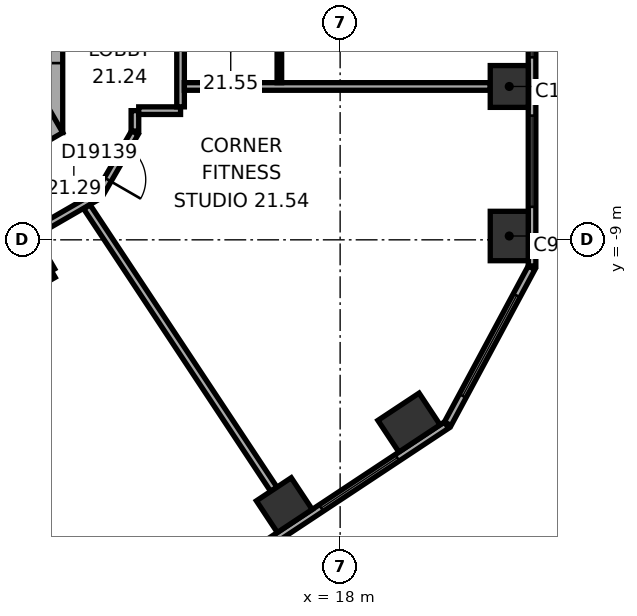
"""IFC4 building model, lengths in metres.
Left out: names, types, materials, properties, quantities, classifications, styles, units other than length and angle.
Written with IfcOpenShell. Run it as: python <this file> out.ifc"""

import sys

from ifc_helpers import new_model, si_unit, direction, frame, frame_2d, origin, origin_2d, place, context, subcontext, project, spatial, rectangle, extrude, element, fill, save


model = new_model("IFC4")
c1 = context("Model", 3, precision=1e-05, world=origin(), true_north=direction((0.0, 1.0)))
c2 = subcontext(c1, "Body", "Model", "MODEL_VIEW")
j1 = project(units=[si_unit("LENGTHUNIT", "METRE"), si_unit("PLANEANGLEUNIT", "RADIAN")], contexts=[c1])
p1 = place(None, origin())
s1 = spatial("IfcSite", under=j1, at=p1, CompositionType="ELEMENT")
p2 = place(p1, origin())
s2 = spatial("IfcBuilding", under=s1, at=p2, CompositionType="ELEMENT")
p3 = place(p2, frame((0.0, 0.0, 93.5)))
s3 = spatial("IfcBuildingStorey", under=s2, at=p3, CompositionType="ELEMENT", Elevation=93.5)
p4 = place(p3, frame((22.45, -8.899, 0.0), z_axis=(0.0, 0.0, 1.0), x_axis=(0.0, 1.0, 0.0)))
e1 = element("IfcColumn", 1, at=p4, inside=s3, PredefinedType="COLUMN", context=c2, shape_type="SweptSolid", body=[
    extrude(rectangle(XDim=1.3, YDim=1.0, at=origin_2d()), origin(), (0.0, 0.0, 1.0), 3.3),
])
for number, where, z_axis, x_axis in (
    (2, (22.45, -4.965, 0.0), (0.0, 0.0, 1.0), (0.0, 1.0, 0.0)),
    (3, (16.531, -15.981, 0.0), (0.0, 0.0, 1.0), (0.834, 0.552, 0.0)),
):
    element("IfcColumn", number, at=place(p3, frame(where, z_axis=z_axis, x_axis=x_axis)), inside=s3, PredefinedType="COLUMN", context=c2, shape_type="SweptSolid", body=[
        extrude(rectangle(XDim=1.1, YDim=1.0, at=origin_2d()), origin(), (0.0, 0.0, 1.0), 3.3),
    ])
p5 = place(p3, frame((19.812, -13.809, 0.0), z_axis=(0.0, 0.0, 1.0), x_axis=(0.833885822067, 0.551936985312, 0.0)))
e4 = element("IfcColumn", 4, at=p5, inside=s3, PredefinedType="COLUMN", context=c2, shape_type="SweptSolid", body=[
    extrude(rectangle(XDim=1.3, YDim=1.0, at=origin_2d()), origin(), (0.0, 0.0, 1.0), 3.3),
])
p6 = place(p3, frame((10.1, -6.177, 0.0), z_axis=(0.0, 0.0, 1.0), x_axis=(0.0, 1.0, 0.0)))
e5 = element("IfcWall", 5, at=p6, inside=s3, PredefinedType="SHEAR", context=c2, shape_type="SweptSolid", body=[
    extrude(rectangle(XDim=12.355, YDim=1.2, at=frame_2d((6.177, 0.0))), origin(), (0.0, 0.0, 1.0), 3.3),
])
p7 = place(p6, frame((6.378, 0.0, 0.0)))
e6 = element("IfcOpeningElement", 6, at=p7, cuts=e5, PredefinedType="OPENING", context=c2, shape_type="SweptSolid", body=[
    extrude(rectangle(XDim=1.5, YDim=2.1, at=frame_2d((0.75, 1.05))), frame((0.0, 0.61, 0.0), z_axis=(0.0, -1.0, 0.0), x_axis=(1.0, 0.0, 0.0)), (0.0, 0.0, 1.0), 1.22),
])
p8 = place(p6, frame((1.828, 0.0, 0.0)))
e7 = element("IfcOpeningElement", 7, at=p8, cuts=e5, PredefinedType="OPENING", context=c2, shape_type="SweptSolid", body=[
    extrude(rectangle(XDim=1.1, YDim=2.1, at=frame_2d((0.55, 1.05))), frame((0.0, 0.61, 0.0), z_axis=(0.0, -1.0, 0.0), x_axis=(1.0, 0.0, 0.0)), (0.0, 0.0, 1.0), 1.22),
])
p9 = place(p6, frame((4.427, 0.0, 0.0)))
e8 = element("IfcOpeningElement", 8, at=p9, cuts=e5, PredefinedType="OPENING", context=c2, shape_type="SweptSolid", body=[
    extrude(rectangle(XDim=1.1, YDim=2.1, at=frame_2d((0.55, 1.05))), frame((0.0, 0.61, 0.0), z_axis=(0.0, -1.0, 0.0), x_axis=(1.0, 0.0, 0.0)), (0.0, 0.0, 1.0), 1.22),
])
p10 = place(p3, frame((-0.3, -11.836, 0.0), z_axis=(0.0, 0.0, 1.0), x_axis=(0.866021384402, 0.500006961711, 0.0)))
e9 = element("IfcWall", 9, at=p10, inside=s3, PredefinedType="SHEAR", context=c2, shape_type="SweptSolid", body=[
    extrude(rectangle(XDim=12.355, YDim=1.2, at=frame_2d((6.178, 0.0))), origin(), (0.0, 0.0, 1.0), 3.3),
])
p11 = place(p10, frame((2.828, 0.0, 0.0)))
e10 = element("IfcOpeningElement", 10, at=p11, cuts=e9, PredefinedType="OPENING", context=c2, shape_type="SweptSolid", body=[
    extrude(rectangle(XDim=0.9, YDim=2.1, at=frame_2d((0.45, 1.05))), frame((0.0, 0.61, 0.0), z_axis=(0.0, -1.0, 0.0), x_axis=(1.0, 0.0, 0.0)), (0.0, 0.0, 1.0), 1.22),
])
p12 = place(p10, frame((5.428, 0.0, 0.0)))
e11 = element("IfcOpeningElement", 11, at=p12, cuts=e9, PredefinedType="OPENING", context=c2, shape_type="SweptSolid", body=[
    extrude(rectangle(XDim=0.9, YDim=2.1, at=frame_2d((0.45, 1.05))), frame((0.0, 0.61, 0.0), z_axis=(0.0, -1.0, 0.0), x_axis=(1.0, 0.0, 0.0)), (0.0, 0.0, 1.0), 1.22),
])
p13 = place(p10, frame((7.928, 0.0, 0.0)))
e12 = element("IfcOpeningElement", 12, at=p13, cuts=e9, PredefinedType="OPENING", context=c2, shape_type="SweptSolid", body=[
    extrude(rectangle(XDim=1.1, YDim=2.1, at=frame_2d((0.55, 1.05))), frame((0.0, 0.61, 0.0), z_axis=(0.0, -1.0, 0.0), x_axis=(1.0, 0.0, 0.0)), (0.0, 0.0, 1.0), 1.22),
])
p14 = place(p3, frame((23.05, -9.687, 0.0), z_axis=(0.0, 0.0, 1.0), x_axis=(0.0, 1.0, 0.0)))
e13 = element("IfcWall", 13, at=p14, inside=s3, PredefinedType="STANDARD", context=c2, shape_type="SweptSolid", body=[
    extrude(rectangle(XDim=21.246, YDim=0.2, at=frame_2d((10.623, 0.0))), origin(), (0.0, 0.0, 1.0), 3.3),
])
p15 = place(p14, frame((1.555, 0.0, 0.8)))
e14 = element("IfcOpeningElement", 14, at=p15, cuts=e13, PredefinedType="OPENING", context=c2, shape_type="SweptSolid", body=[
    extrude(rectangle(XDim=2.4, YDim=1.7, at=frame_2d((1.2, 0.85))), frame((0.0, 0.11, 0.0), z_axis=(0.0, -1.0, 0.0), x_axis=(1.0, 0.0, 0.0)), (0.0, 0.0, 1.0), 0.22),
])
p16 = place(p14, frame((5.489, 0.0, 0.8)))
e15 = element("IfcOpeningElement", 15, at=p16, cuts=e13, PredefinedType="OPENING", context=c2, shape_type="SweptSolid", body=[
    extrude(rectangle(XDim=2.4, YDim=1.7, at=frame_2d((1.2, 0.85))), frame((0.0, 0.11, 0.0), z_axis=(0.0, -1.0, 0.0), x_axis=(1.0, 0.0, 0.0)), (0.0, 0.0, 1.0), 0.22),
])
p17 = place(p14, frame((9.424, 0.0, 0.8)))
e16 = element("IfcOpeningElement", 16, at=p17, cuts=e13, PredefinedType="OPENING", context=c2, shape_type="SweptSolid", body=[
    extrude(rectangle(XDim=2.4, YDim=1.7, at=frame_2d((1.2, 0.85))), frame((0.0, 0.11, 0.0), z_axis=(0.0, -1.0, 0.0), x_axis=(1.0, 0.0, 0.0)), (0.0, 0.0, 1.0), 0.22),
])
p18 = place(p14, frame((13.358, 0.0, 0.8)))
e17 = element("IfcOpeningElement", 17, at=p18, cuts=e13, PredefinedType="OPENING", context=c2, shape_type="SweptSolid", body=[
    extrude(rectangle(XDim=2.4, YDim=1.7, at=frame_2d((1.2, 0.85))), frame((0.0, 0.11, 0.0), z_axis=(0.0, -1.0, 0.0), x_axis=(1.0, 0.0, 0.0)), (0.0, 0.0, 1.0), 0.22),
])
p19 = place(p14, frame((17.293, 0.0, 0.8)))
e18 = element("IfcOpeningElement", 18, at=p19, cuts=e13, PredefinedType="OPENING", context=c2, shape_type="SweptSolid", body=[
    extrude(rectangle(XDim=2.4, YDim=1.7, at=frame_2d((1.2, 0.85))), frame((0.0, 0.11, 0.0), z_axis=(0.0, -1.0, 0.0), x_axis=(1.0, 0.0, 0.0)), (0.0, 0.0, 1.0), 0.22),
])
p20 = place(p3, frame((3.083, -25.601, 0.0), z_axis=(0.0, 0.0, 1.0), x_axis=(0.833884295743, 0.551939291329, 0.0)))
e19 = element("IfcWall", 19, at=p20, inside=s3, PredefinedType="STANDARD", context=c2, shape_type="SweptSolid", body=[
    extrude(rectangle(XDim=21.246, YDim=0.2, at=frame_2d((10.623, 0.0))), origin(), (0.0, 0.0, 1.0), 3.3),
])
p21 = place(p20, frame((1.553, 0.0, 0.8)))
e20 = element("IfcOpeningElement", 20, at=p21, cuts=e19, PredefinedType="OPENING", context=c2, shape_type="SweptSolid", body=[
    extrude(rectangle(XDim=2.4, YDim=1.7, at=frame_2d((1.2, 0.85))), frame((0.0, 0.11, 0.0), z_axis=(0.0, -1.0, 0.0), x_axis=(1.0, 0.0, 0.0)), (0.0, 0.0, 1.0), 0.22),
])
p22 = place(p20, frame((5.488, 0.0, 0.8)))
e21 = element("IfcOpeningElement", 21, at=p22, cuts=e19, PredefinedType="OPENING", context=c2, shape_type="SweptSolid", body=[
    extrude(rectangle(XDim=2.4, YDim=1.7, at=frame_2d((1.2, 0.85))), frame((0.0, 0.11, 0.0), z_axis=(0.0, -1.0, 0.0), x_axis=(1.0, 0.0, 0.0)), (0.0, 0.0, 1.0), 0.22),
])
p23 = place(p20, frame((9.422, 0.0, 0.8)))
e22 = element("IfcOpeningElement", 22, at=p23, cuts=e19, PredefinedType="OPENING", context=c2, shape_type="SweptSolid", body=[
    extrude(rectangle(XDim=2.4, YDim=1.7, at=frame_2d((1.2, 0.85))), frame((0.0, 0.11, 0.0), z_axis=(0.0, -1.0, 0.0), x_axis=(1.0, 0.0, 0.0)), (0.0, 0.0, 1.0), 0.22),
])
p24 = place(p20, frame((13.357, 0.0, 0.8)))
e23 = element("IfcOpeningElement", 23, at=p24, cuts=e19, PredefinedType="OPENING", context=c2, shape_type="SweptSolid", body=[
    extrude(rectangle(XDim=2.4, YDim=1.7, at=frame_2d((1.2, 0.85))), frame((0.0, 0.11, 0.0), z_axis=(0.0, -1.0, 0.0), x_axis=(1.0, 0.0, 0.0)), (0.0, 0.0, 1.0), 0.22),
])
p25 = place(p20, frame((17.291, 0.0, 0.8)))
e24 = element("IfcOpeningElement", 24, at=p25, cuts=e19, PredefinedType="OPENING", context=c2, shape_type="SweptSolid", body=[
    extrude(rectangle(XDim=2.4, YDim=1.7, at=frame_2d((1.2, 0.85))), frame((0.0, 0.11, 0.0), z_axis=(0.0, -1.0, 0.0), x_axis=(1.0, 0.0, 0.0)), (0.0, 0.0, 1.0), 0.22),
])
p26 = place(p3, frame((20.833, -13.839, 0.0), z_axis=(0.0, 0.0, 1.0), x_axis=(0.473321668581, 0.880889662813, 0.0)))
e25 = element("IfcWall", 25, at=p26, inside=s3, PredefinedType="STANDARD", context=c2, shape_type="SweptSolid", body=[
    extrude(rectangle(XDim=4.66, YDim=0.2, at=frame_2d((2.33, 0.0))), origin(), (0.0, 0.0, 1.0), 3.3),
])
p27 = place(p26, frame((0.83, 0.0, 0.8)))
e26 = element("IfcOpeningElement", 26, at=p27, cuts=e25, PredefinedType="OPENING", context=c2, shape_type="SweptSolid", body=[
    extrude(rectangle(XDim=3.0, YDim=1.7, at=frame_2d((1.5, 0.85))), frame((0.0, 0.11, 0.0), z_axis=(0.0, -1.0, 0.0), x_axis=(1.0, 0.0, 0.0)), (0.0, 0.0, 1.0), 0.22),
])
p28 = place(p3, frame((7.419, -11.653, 0.0), z_axis=(0.0, 0.0, 1.0), x_axis=(0.866038154057, 0.49997791523, 0.0)))
e27 = element("IfcWall", 27, at=p28, inside=s3, PredefinedType="PARTITIONING", context=c2, shape_type="SweptSolid", body=[
    extrude(rectangle(XDim=3.502, YDim=0.2, at=frame_2d((1.751, 0.0))), origin(), (0.0, 0.0, 1.0), 3.05),
])
p29 = place(p3, frame((9.852, -8.861, 0.0), z_axis=(0.0, 0.0, 1.0), x_axis=(0.866013291437, 0.500020978615, 0.0)))
e28 = element("IfcWall", 28, at=p29, inside=s3, PredefinedType="PARTITIONING", context=c2, shape_type="SweptSolid", body=[
    extrude(rectangle(XDim=2.077, YDim=0.2, at=frame_2d((1.038, 0.0))), origin(), (0.0, 0.0, 1.0), 3.05),
])
p30 = place(p3, frame((10.402, -9.815, 0.0), z_axis=(0.0, 0.0, 1.0), x_axis=(-0.499968756647, 0.866043441391, 0.0)))
e29 = element("IfcWall", 29, at=p30, inside=s3, PredefinedType="PARTITIONING", context=c2, shape_type="SweptSolid", body=[
    extrude(rectangle(XDim=1.001, YDim=0.2, at=frame_2d((0.5, 0.0))), origin(), (0.0, 0.0, 1.0), 3.05),
])
p31 = place(p3, frame((11.67, -7.788, 0.0), z_axis=(0.0, 0.0, 1.0), x_axis=(0.500063286585, 0.865988862174, 0.0)))
e30 = element("IfcWall", 30, at=p31, inside=s3, PredefinedType="PARTITIONING", context=c2, shape_type="SweptSolid", body=[
    extrude(rectangle(XDim=1.86, YDim=0.2, at=frame_2d((0.93, 0.0))), origin(), (0.0, 0.0, 1.0), 3.05),
])
p32 = place(p31, frame((0.43, 0.0, 0.0)))
e31 = element("IfcOpeningElement", 31, at=p32, cuts=e30, PredefinedType="OPENING", context=c2, shape_type="SweptSolid", body=[
    extrude(rectangle(XDim=1.0, YDim=2.1, at=frame_2d((0.5, 1.05))), frame((0.0, 0.11, 0.0), z_axis=(0.0, -1.0, 0.0), x_axis=(1.0, 0.0, 0.0)), (0.0, 0.0, 1.0), 0.22),
])
p33 = place(p3, frame((12.6, -6.138, 0.0), z_axis=(0.0, 0.0, 1.0), x_axis=(0.0, 1.0, 0.0)))
e32 = element("IfcWall", 32, at=p33, inside=s3, PredefinedType="PARTITIONING", context=c2, shape_type="SweptSolid", body=[
    extrude(rectangle(XDim=0.537, YDim=0.2, at=frame_2d((0.268, 0.0))), origin(), (0.0, 0.0, 1.0), 3.05),
])
p34 = place(p3, frame((12.7, -5.601, 0.0), z_axis=(0.0, 0.0, 1.0), x_axis=(1.0, 0.0, 0.0)))
e33 = element("IfcWall", 33, at=p34, inside=s3, PredefinedType="PARTITIONING", context=c2, shape_type="SweptSolid", body=[
    extrude(rectangle(XDim=1.101, YDim=0.2, at=frame_2d((0.551, 0.0))), origin(), (0.0, 0.0, 1.0), 3.05),
])
p35 = place(p3, frame((13.801, -5.501, 0.0), z_axis=(0.0, 0.0, 1.0), x_axis=(0.0, 1.0, 0.0)))
e34 = element("IfcWall", 34, at=p35, inside=s3, PredefinedType="PARTITIONING", context=c2, shape_type="SweptSolid", body=[
    extrude(rectangle(XDim=5.702, YDim=0.2, at=frame_2d((2.851, 0.0))), origin(), (0.0, 0.0, 1.0), 3.05),
])
p36 = place(p35, frame((3.079, 0.0, 0.0)))
e35 = element("IfcOpeningElement", 35, at=p36, cuts=e34, PredefinedType="OPENING", context=c2, shape_type="SweptSolid", body=[
    extrude(rectangle(XDim=0.9, YDim=2.1, at=frame_2d((0.45, 1.05))), frame((0.0, 0.11, 0.0), z_axis=(0.0, -1.0, 0.0), x_axis=(1.0, 0.0, 0.0)), (0.0, 0.0, 1.0), 0.22),
])
p37 = place(p35, frame((4.636, 0.0, 0.0)))
e36 = element("IfcOpeningElement", 36, at=p37, cuts=e34, PredefinedType="OPENING", context=c2, shape_type="SweptSolid", body=[
    extrude(rectangle(XDim=0.9, YDim=2.1, at=frame_2d((0.45, 1.05))), frame((0.0, 0.11, 0.0), z_axis=(0.0, -1.0, 0.0), x_axis=(1.0, 0.0, 0.0)), (0.0, 0.0, 1.0), 0.22),
])
p38 = place(p3, frame((13.901, -4.965, 0.0), z_axis=(0.0, 0.0, 1.0), x_axis=(1.0, 0.0, 0.0)))
e37 = element("IfcWall", 37, at=p38, inside=s3, PredefinedType="PARTITIONING", context=c2, shape_type="SweptSolid", body=[
    extrude(rectangle(XDim=8.049, YDim=0.2, at=frame_2d((4.024, 0.0))), origin(), (0.0, 0.0, 1.0), 3.05),
])
p39 = place(p3, frame((16.255, -15.564, 0.0), z_axis=(0.0, 0.0, 1.0), x_axis=(-0.55192208744, 0.833895682562, 0.0)))
e38 = element("IfcWall", 38, at=p39, inside=s3, PredefinedType="PARTITIONING", context=c2, shape_type="SweptSolid", body=[
    extrude(rectangle(XDim=8.913, YDim=0.2, at=frame_2d((4.457, 0.0))), origin(), (0.0, 0.0, 1.0), 2.6),
])
p40 = place(p3, frame((16.401, -3.025, 0.0), z_axis=(0.0, 0.0, 1.0), x_axis=(0.0, -1.0, 0.0)))
e39 = element("IfcWall", 39, at=p40, inside=s3, PredefinedType="PARTITIONING", context=c2, shape_type="SweptSolid", body=[
    extrude(rectangle(XDim=1.84, YDim=0.12, at=frame_2d((0.92, 0.0))), origin(), (0.0, 0.0, 1.0), 3.05),
])
p41 = place(p15, origin())
e40 = element("IfcWindow", 40, at=p41, inside=s3, PartitioningType="SINGLE_PANEL", PredefinedType="WINDOW", context=c2, shape_type="SweptSolid", body=[
    extrude(rectangle(XDim=2.4, YDim=1.7, at=frame_2d((1.2, 0.85))), frame((0.0, 0.03, 0.0), z_axis=(0.0, -1.0, 0.0), x_axis=(1.0, 0.0, 0.0)), (0.0, 0.0, 1.0), 0.06),
])
fill(e14, e40)
p42 = place(p16, origin())
e41 = element("IfcWindow", 41, at=p42, inside=s3, PartitioningType="SINGLE_PANEL", PredefinedType="WINDOW", context=c2, shape_type="SweptSolid", body=[
    extrude(rectangle(XDim=2.4, YDim=1.7, at=frame_2d((1.2, 0.85))), frame((0.0, 0.03, 0.0), z_axis=(0.0, -1.0, 0.0), x_axis=(1.0, 0.0, 0.0)), (0.0, 0.0, 1.0), 0.06),
])
fill(e15, e41)
p43 = place(p25, origin())
e42 = element("IfcWindow", 42, at=p43, inside=s3, PartitioningType="SINGLE_PANEL", PredefinedType="WINDOW", context=c2, shape_type="SweptSolid", body=[
    extrude(rectangle(XDim=2.4, YDim=1.7, at=frame_2d((1.2, 0.85))), frame((0.0, 0.03, 0.0), z_axis=(0.0, -1.0, 0.0), x_axis=(1.0, 0.0, 0.0)), (0.0, 0.0, 1.0), 0.06),
])
fill(e24, e42)
p44 = place(p27, origin())
e43 = element("IfcWindow", 43, at=p44, inside=s3, PartitioningType="SINGLE_PANEL", PredefinedType="WINDOW", context=c2, shape_type="SweptSolid", body=[
    extrude(rectangle(XDim=3.0, YDim=1.7, at=frame_2d((1.5, 0.85))), frame((0.0, 0.03, 0.0), z_axis=(0.0, -1.0, 0.0), x_axis=(1.0, 0.0, 0.0)), (0.0, 0.0, 1.0), 0.06),
])
fill(e26, e43)
p45 = place(p32, origin())
e44 = element("IfcDoor", 44, at=p45, inside=s3, OperationType="SINGLE_SWING_LEFT", PredefinedType="DOOR", context=c2, shape_type="SweptSolid", body=[
    extrude(rectangle(XDim=1.0, YDim=2.1, at=frame_2d((0.5, 1.05))), frame((0.0, 0.025, 0.0), z_axis=(0.0, -1.0, 0.0), x_axis=(1.0, 0.0, 0.0)), (0.0, 0.0, 1.0), 0.05),
])
fill(e31, e44)
save(model, sys.argv[1])
